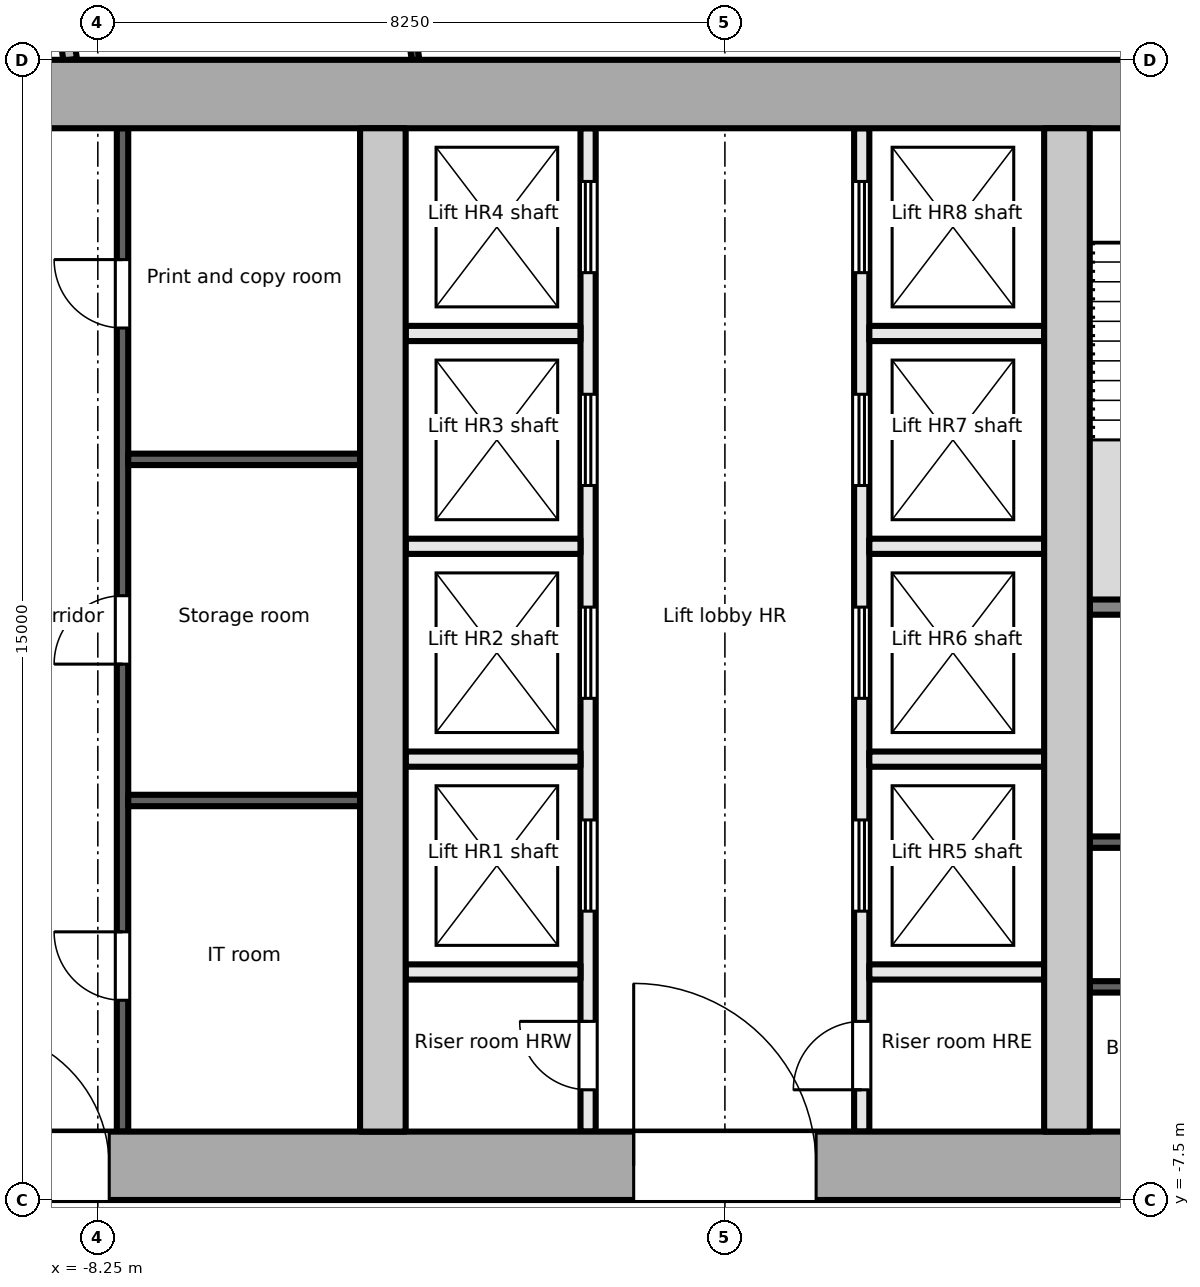
"""IFC4 building model, lengths in metres.
Left out: names, types, materials, properties, quantities, classifications, styles, units other than length and angle.
Written with IfcOpenShell. Run it as: python <this file> out.ifc"""

import sys

from ifc_helpers import new_model, si_unit, direction, frame, frame_2d, origin, place, context, subcontext, project, spatial, rectangle, extrude, element, fill, save


model = new_model("IFC4")
c1 = context("Model", 3, precision=1e-05, world=origin(), true_north=direction((0.0, 1.0)))
c2 = subcontext(c1, "Body", "Model", "MODEL_VIEW")
j1 = project(units=[si_unit("LENGTHUNIT", "METRE"), si_unit("PLANEANGLEUNIT", "RADIAN")], contexts=[c1])
p1 = place(None, origin())
s1 = spatial("IfcSite", under=j1, at=p1, CompositionType="ELEMENT")
p2 = place(p1, origin())
s2 = spatial("IfcBuilding", under=s1, at=p2, CompositionType="ELEMENT")
p3 = place(p2, frame((0.0, 0.0, 255.1)))
s3 = spatial("IfcBuildingStorey", under=s2, at=p3, CompositionType="ELEMENT", Elevation=255.1)
p4 = place(p3, frame((-18.0, -7.05, -0.2), z_axis=(0.0, 0.0, 1.0), x_axis=(1.0, 0.0, 0.0)))
e1 = element("IfcWall", 1, at=p4, inside=s3, PredefinedType="SHEAR", context=c2, shape_type="SweptSolid", body=[
    extrude(rectangle(XDim=36.0, YDim=0.9, at=frame_2d((18.0, 0.0))), origin(), (0.0, 0.0, 1.0), 3.9),
])
p5 = place(p4, frame((8.1, 0.0, 0.2)))
e2 = element("IfcOpeningElement", 2, at=p5, cuts=e1, PredefinedType="OPENING", context=c2, shape_type="SweptSolid", body=[
    extrude(rectangle(XDim=1.8, YDim=2.1, at=frame_2d((0.9, 1.05))), frame((0.0, 0.46, 0.0), z_axis=(0.0, -1.0, 0.0), x_axis=(1.0, 0.0, 0.0)), (0.0, 0.0, 1.0), 0.921),
])
p6 = place(p4, frame((16.8, 0.0, 0.2)))
e3 = element("IfcOpeningElement", 3, at=p6, cuts=e1, PredefinedType="OPENING", context=c2, shape_type="SweptSolid", body=[
    extrude(rectangle(XDim=2.4, YDim=2.1, at=frame_2d((1.2, 1.05))), frame((0.0, 0.46, 0.0), z_axis=(0.0, -1.0, 0.0), x_axis=(1.0, 0.0, 0.0)), (0.0, 0.0, 1.0), 0.921),
])
p7 = place(p4, frame((26.1, 0.0, 0.2)))
e4 = element("IfcOpeningElement", 4, at=p7, cuts=e1, PredefinedType="OPENING", context=c2, shape_type="SweptSolid", body=[
    extrude(rectangle(XDim=2.4, YDim=2.1, at=frame_2d((1.2, 1.05))), frame((0.0, 0.46, 0.0), z_axis=(0.0, -1.0, 0.0), x_axis=(1.0, 0.0, 0.0)), (0.0, 0.0, 1.0), 0.921),
])
p8 = place(p3, frame((-18.0, 7.05, -0.2), z_axis=(0.0, 0.0, 1.0), x_axis=(1.0, 0.0, 0.0)))
e5 = element("IfcWall", 5, at=p8, inside=s3, PredefinedType="SHEAR", context=c2, shape_type="SweptSolid", body=[
    extrude(rectangle(XDim=36.0, YDim=0.9, at=frame_2d((18.0, 0.0))), origin(), (0.0, 0.0, 1.0), 3.9),
])
for number, where, z_axis, x_axis in (
    (6, (-4.5, -6.6, -0.2), (0.0, 0.0, 1.0), (0.0, 1.0, 0.0)),
    (7, (4.5, -6.6, -0.2), (0.0, 0.0, 1.0), (0.0, 1.0, 0.0)),
):
    element("IfcWall", number, at=place(p3, frame(where, z_axis=z_axis, x_axis=x_axis)), inside=s3, PredefinedType="SHEAR", context=c2, shape_type="SweptSolid", body=[
        extrude(rectangle(XDim=13.2, YDim=0.6, at=frame_2d((6.6, 0.0))), origin(), (0.0, 0.0, 1.0), 3.9),
    ])
p9 = place(p3, frame((-7.925, -6.6, 0.0), z_axis=(0.0, 0.0, 1.0), x_axis=(0.0, 1.0, 0.0)))
e8 = element("IfcWall", 8, at=p9, inside=s3, PredefinedType="PARTITIONING", context=c2, shape_type="SweptSolid", body=[
    extrude(rectangle(XDim=13.2, YDim=0.15, at=frame_2d((6.6, 0.0))), origin(), (0.0, 0.0, 1.0), 3.7),
])
p10 = place(p9, frame((1.728, 0.0, 0.0)))
e9 = element("IfcOpeningElement", 9, at=p10, cuts=e8, PredefinedType="OPENING", context=c2, shape_type="SweptSolid", body=[
    extrude(rectangle(XDim=0.9, YDim=2.1, at=frame_2d((0.45, 1.05))), frame((0.0, 0.085, 0.0), z_axis=(0.0, -1.0, 0.0), x_axis=(1.0, 0.0, 0.0)), (0.0, 0.0, 1.0), 0.171),
])
p11 = place(p9, frame((6.15, 0.0, 0.0)))
e10 = element("IfcOpeningElement", 10, at=p11, cuts=e8, PredefinedType="OPENING", context=c2, shape_type="SweptSolid", body=[
    extrude(rectangle(XDim=0.9, YDim=2.1, at=frame_2d((0.45, 1.05))), frame((0.0, 0.085, 0.0), z_axis=(0.0, -1.0, 0.0), x_axis=(1.0, 0.0, 0.0)), (0.0, 0.0, 1.0), 0.171),
])
p12 = place(p9, frame((10.572, 0.0, 0.0)))
e11 = element("IfcOpeningElement", 11, at=p12, cuts=e8, PredefinedType="OPENING", context=c2, shape_type="SweptSolid", body=[
    extrude(rectangle(XDim=0.9, YDim=2.1, at=frame_2d((0.45, 1.05))), frame((0.0, 0.085, 0.0), z_axis=(0.0, -1.0, 0.0), x_axis=(1.0, 0.0, 0.0)), (0.0, 0.0, 1.0), 0.171),
])
for number, where, z_axis, x_axis in (
    (12, (-7.85, -2.244, 0.0), (0.0, 0.0, 1.0), (1.0, 0.0, 0.0)),
    (13, (-7.85, 2.244, 0.0), (0.0, 0.0, 1.0), (1.0, 0.0, 0.0)),
):
    element("IfcWall", number, at=place(p3, frame(where, z_axis=z_axis, x_axis=x_axis)), inside=s3, PredefinedType="PARTITIONING", context=c2, shape_type="SweptSolid", body=[
        extrude(rectangle(XDim=3.05, YDim=0.15, at=frame_2d((1.525, 0.0))), origin(), (0.0, 0.0, 1.0), 3.7),
    ])
p13 = place(p3, frame((-1.8, -6.6, 0.0), z_axis=(0.0, 0.0, 1.0), x_axis=(0.0, 1.0, 0.0)))
e14 = element("IfcWall", 14, at=p13, inside=s3, PredefinedType="PARTITIONING", context=c2, shape_type="SweptSolid", body=[
    extrude(rectangle(XDim=13.2, YDim=0.2, at=frame_2d((6.6, 0.0))), origin(), (0.0, 0.0, 1.0), 3.7),
])
p14 = place(p13, frame((0.55, 0.0, 0.0)))
e15 = element("IfcOpeningElement", 15, at=p14, cuts=e14, PredefinedType="OPENING", context=c2, shape_type="SweptSolid", body=[
    extrude(rectangle(XDim=0.9, YDim=2.1, at=frame_2d((0.45, 1.05))), frame((0.0, 0.111, 0.0), z_axis=(0.0, -1.0, 0.0), x_axis=(1.0, 0.0, 0.0)), (0.0, 0.0, 1.0), 0.221),
])
p15 = place(p13, frame((2.9, 0.0, 0.0)))
e16 = element("IfcOpeningElement", 16, at=p15, cuts=e14, PredefinedType="OPENING", context=c2, shape_type="SweptSolid", body=[
    extrude(rectangle(XDim=1.2, YDim=2.1, at=frame_2d((0.6, 1.05))), frame((0.0, 0.111, 0.0), z_axis=(0.0, -1.0, 0.0), x_axis=(1.0, 0.0, 0.0)), (0.0, 0.0, 1.0), 0.221),
])
p16 = place(p13, frame((5.7, 0.0, 0.0)))
e17 = element("IfcOpeningElement", 17, at=p16, cuts=e14, PredefinedType="OPENING", context=c2, shape_type="SweptSolid", body=[
    extrude(rectangle(XDim=1.2, YDim=2.1, at=frame_2d((0.6, 1.05))), frame((0.0, 0.111, 0.0), z_axis=(0.0, -1.0, 0.0), x_axis=(1.0, 0.0, 0.0)), (0.0, 0.0, 1.0), 0.221),
])
p17 = place(p13, frame((8.5, 0.0, 0.0)))
e18 = element("IfcOpeningElement", 18, at=p17, cuts=e14, PredefinedType="OPENING", context=c2, shape_type="SweptSolid", body=[
    extrude(rectangle(XDim=1.2, YDim=2.1, at=frame_2d((0.6, 1.05))), frame((0.0, 0.111, 0.0), z_axis=(0.0, -1.0, 0.0), x_axis=(1.0, 0.0, 0.0)), (0.0, 0.0, 1.0), 0.221),
])
p18 = place(p13, frame((11.3, 0.0, 0.0)))
e19 = element("IfcOpeningElement", 19, at=p18, cuts=e14, PredefinedType="OPENING", context=c2, shape_type="SweptSolid", body=[
    extrude(rectangle(XDim=1.2, YDim=2.1, at=frame_2d((0.6, 1.05))), frame((0.0, 0.111, 0.0), z_axis=(0.0, -1.0, 0.0), x_axis=(1.0, 0.0, 0.0)), (0.0, 0.0, 1.0), 0.221),
])
p19 = place(p3, frame((1.8, -6.6, 0.0), z_axis=(0.0, 0.0, 1.0), x_axis=(0.0, 1.0, 0.0)))
e20 = element("IfcWall", 20, at=p19, inside=s3, PredefinedType="PARTITIONING", context=c2, shape_type="SweptSolid", body=[
    extrude(rectangle(XDim=13.2, YDim=0.2, at=frame_2d((6.6, 0.0))), origin(), (0.0, 0.0, 1.0), 3.7),
])
p20 = place(p19, frame((0.55, 0.0, 0.0)))
e21 = element("IfcOpeningElement", 21, at=p20, cuts=e20, PredefinedType="OPENING", context=c2, shape_type="SweptSolid", body=[
    extrude(rectangle(XDim=0.9, YDim=2.1, at=frame_2d((0.45, 1.05))), frame((0.0, 0.111, 0.0), z_axis=(0.0, -1.0, 0.0), x_axis=(1.0, 0.0, 0.0)), (0.0, 0.0, 1.0), 0.221),
])
p21 = place(p19, frame((2.9, 0.0, 0.0)))
e22 = element("IfcOpeningElement", 22, at=p21, cuts=e20, PredefinedType="OPENING", context=c2, shape_type="SweptSolid", body=[
    extrude(rectangle(XDim=1.2, YDim=2.1, at=frame_2d((0.6, 1.05))), frame((0.0, 0.111, 0.0), z_axis=(0.0, -1.0, 0.0), x_axis=(1.0, 0.0, 0.0)), (0.0, 0.0, 1.0), 0.221),
])
p22 = place(p19, frame((5.7, 0.0, 0.0)))
e23 = element("IfcOpeningElement", 23, at=p22, cuts=e20, PredefinedType="OPENING", context=c2, shape_type="SweptSolid", body=[
    extrude(rectangle(XDim=1.2, YDim=2.1, at=frame_2d((0.6, 1.05))), frame((0.0, 0.111, 0.0), z_axis=(0.0, -1.0, 0.0), x_axis=(1.0, 0.0, 0.0)), (0.0, 0.0, 1.0), 0.221),
])
p23 = place(p19, frame((8.5, 0.0, 0.0)))
e24 = element("IfcOpeningElement", 24, at=p23, cuts=e20, PredefinedType="OPENING", context=c2, shape_type="SweptSolid", body=[
    extrude(rectangle(XDim=1.2, YDim=2.1, at=frame_2d((0.6, 1.05))), frame((0.0, 0.111, 0.0), z_axis=(0.0, -1.0, 0.0), x_axis=(1.0, 0.0, 0.0)), (0.0, 0.0, 1.0), 0.221),
])
p24 = place(p19, frame((11.3, 0.0, 0.0)))
e25 = element("IfcOpeningElement", 25, at=p24, cuts=e20, PredefinedType="OPENING", context=c2, shape_type="SweptSolid", body=[
    extrude(rectangle(XDim=1.2, YDim=2.1, at=frame_2d((0.6, 1.05))), frame((0.0, 0.111, 0.0), z_axis=(0.0, -1.0, 0.0), x_axis=(1.0, 0.0, 0.0)), (0.0, 0.0, 1.0), 0.221),
])
for number, where, z_axis, x_axis in (
    (26, (-4.2, -1.7, 0.0), (0.0, 0.0, 1.0), (1.0, 0.0, 0.0)),
    (27, (-4.2, 1.1, 0.0), (0.0, 0.0, 1.0), (1.0, 0.0, 0.0)),
    (28, (-4.2, 3.9, 0.0), (0.0, 0.0, 1.0), (1.0, 0.0, 0.0)),
    (29, (-4.2, -4.5, 0.0), (0.0, 0.0, 1.0), (1.0, 0.0, 0.0)),
    (30, (1.9, -1.7, 0.0), (0.0, 0.0, 1.0), (1.0, 0.0, 0.0)),
    (31, (1.9, 1.1, 0.0), (0.0, 0.0, 1.0), (1.0, 0.0, 0.0)),
    (32, (1.9, 3.9, 0.0), (0.0, 0.0, 1.0), (1.0, 0.0, 0.0)),
    (33, (1.9, -4.5, 0.0), (0.0, 0.0, 1.0), (1.0, 0.0, 0.0)),
):
    element("IfcWall", number, at=place(p3, frame(where, z_axis=z_axis, x_axis=x_axis)), inside=s3, PredefinedType="PARTITIONING", context=c2, shape_type="SweptSolid", body=[
        extrude(rectangle(XDim=2.3, YDim=0.2, at=frame_2d((1.15, 0.0))), origin(), (0.0, 0.0, 1.0), 3.7),
    ])
p25 = place(p3, frame((4.8, 0.3, 0.0), z_axis=(0.0, 0.0, 1.0), x_axis=(1.0, 0.0, 0.0)))
e34 = element("IfcWall", 34, at=p25, inside=s3, PredefinedType="PARTITIONING", context=c2, shape_type="SweptSolid", body=[
    extrude(rectangle(XDim=3.15, YDim=0.2, at=frame_2d((1.575, 0.0))), origin(), (0.0, 0.0, 1.0), 3.7),
])
for number, where, z_axis, x_axis in (
    (35, (4.8, -4.696, 0.0), (0.0, 0.0, 1.0), (1.0, 0.0, 0.0)),
    (36, (4.8, -2.792, 0.0), (0.0, 0.0, 1.0), (1.0, 0.0, 0.0)),
):
    element("IfcWall", number, at=place(p3, frame(where, z_axis=z_axis, x_axis=x_axis)), inside=s3, PredefinedType="PARTITIONING", context=c2, shape_type="SweptSolid", body=[
        extrude(rectangle(XDim=3.15, YDim=0.15, at=frame_2d((1.575, 0.0))), origin(), (0.0, 0.0, 1.0), 3.7),
    ])
p26 = place(p3, frame((-9.273, 12.191, 0.0), z_axis=(0.0, 0.0, 1.0), x_axis=(0.139104789371, -0.990277666907, 0.0)))
e37 = element("IfcWall", 37, at=p26, inside=s3, PredefinedType="PARTITIONING", context=c2, shape_type="SweptSolid", body=[
    extrude(rectangle(XDim=4.737, YDim=0.18, at=frame_2d((2.369, 0.0))), origin(), (0.0, 0.0, 1.0), 3.4),
])
p27 = place(p3, frame((-4.07, 7.5, 0.0), z_axis=(0.0, 0.0, 1.0), x_axis=(-0.139122430522, 0.990275188685, 0.0)))
e38 = element("IfcWall", 38, at=p27, inside=s3, PredefinedType="PARTITIONING", context=c2, shape_type="SweptSolid", body=[
    extrude(rectangle(XDim=5.368, YDim=0.1, at=frame_2d((2.684, 0.0))), origin(), (0.0, 0.0, 1.0), 3.4),
])
p28 = place(p27, frame((3.098, 0.0, 0.0)))
e39 = element("IfcOpeningElement", 39, at=p28, cuts=e38, PredefinedType="OPENING", context=c2, shape_type="SweptSolid", body=[
    extrude(rectangle(XDim=0.8, YDim=2.1, at=frame_2d((0.4, 1.05))), frame((0.0, 0.061, 0.0), z_axis=(0.0, -1.0, 0.0), x_axis=(1.0, 0.0, 0.0)), (0.0, 0.0, 1.0), 0.121),
])
p29 = place(p27, frame((0.649, 0.0, 0.9)))
e40 = element("IfcOpeningElement", 40, at=p29, cuts=e38, PredefinedType="OPENING", context=c2, shape_type="SweptSolid", body=[
    extrude(rectangle(XDim=1.8, YDim=1.2, at=frame_2d((0.9, 0.6))), frame((0.0, 0.061, 0.0), z_axis=(0.0, -1.0, 0.0), x_axis=(1.0, 0.0, 0.0)), (0.0, 0.0, 1.0), 0.121),
])
p30 = place(p10, origin())
e41 = element("IfcDoor", 41, at=p30, inside=s3, OperationType="SINGLE_SWING_RIGHT", PredefinedType="DOOR", context=c2, shape_type="SweptSolid", body=[
    extrude(rectangle(XDim=0.9, YDim=2.1, at=frame_2d((0.45, 1.05))), frame((0.0, 0.025, 0.0), z_axis=(0.0, -1.0, 0.0), x_axis=(1.0, 0.0, 0.0)), (0.0, 0.0, 1.0), 0.05),
])
fill(e9, e41)
p31 = place(p11, origin())
e42 = element("IfcDoor", 42, at=p31, inside=s3, OperationType="SINGLE_SWING_LEFT", PredefinedType="DOOR", context=c2, shape_type="SweptSolid", body=[
    extrude(rectangle(XDim=0.9, YDim=2.1, at=frame_2d((0.45, 1.05))), frame((0.0, 0.025, 0.0), z_axis=(0.0, -1.0, 0.0), x_axis=(1.0, 0.0, 0.0)), (0.0, 0.0, 1.0), 0.05),
])
fill(e10, e42)
p32 = place(p12, origin())
e43 = element("IfcDoor", 43, at=p32, inside=s3, OperationType="SINGLE_SWING_RIGHT", PredefinedType="DOOR", context=c2, shape_type="SweptSolid", body=[
    extrude(rectangle(XDim=0.9, YDim=2.1, at=frame_2d((0.45, 1.05))), frame((0.0, 0.025, 0.0), z_axis=(0.0, -1.0, 0.0), x_axis=(1.0, 0.0, 0.0)), (0.0, 0.0, 1.0), 0.05),
])
fill(e11, e43)
p33 = place(p5, origin())
e44 = element("IfcDoor", 44, at=p33, inside=s3, OperationType="SINGLE_SWING_LEFT", PredefinedType="DOOR", context=c2, shape_type="SweptSolid", body=[
    extrude(rectangle(XDim=1.8, YDim=2.1, at=frame_2d((0.9, 1.05))), frame((0.0, 0.025, 0.0), z_axis=(0.0, -1.0, 0.0), x_axis=(1.0, 0.0, 0.0)), (0.0, 0.0, 1.0), 0.05),
])
fill(e2, e44)
p34 = place(p14, origin())
e45 = element("IfcDoor", 45, at=p34, inside=s3, OperationType="SINGLE_SWING_RIGHT", PredefinedType="DOOR", context=c2, shape_type="SweptSolid", body=[
    extrude(rectangle(XDim=0.9, YDim=2.1, at=frame_2d((0.45, 1.05))), frame((0.0, 0.025, 0.0), z_axis=(0.0, -1.0, 0.0), x_axis=(1.0, 0.0, 0.0)), (0.0, 0.0, 1.0), 0.05),
])
fill(e15, e45)
p35 = place(p15, origin())
e46 = element("IfcDoor", 46, at=p35, inside=s3, OperationType="DOUBLE_DOOR_SLIDING", PredefinedType="DOOR", context=c2, shape_type="SweptSolid", body=[
    extrude(rectangle(XDim=1.2, YDim=2.1, at=frame_2d((0.6, 1.05))), frame((0.0, 0.025, 0.0), z_axis=(0.0, -1.0, 0.0), x_axis=(1.0, 0.0, 0.0)), (0.0, 0.0, 1.0), 0.05),
])
fill(e16, e46)
p36 = place(p16, origin())
e47 = element("IfcDoor", 47, at=p36, inside=s3, OperationType="DOUBLE_DOOR_SLIDING", PredefinedType="DOOR", context=c2, shape_type="SweptSolid", body=[
    extrude(rectangle(XDim=1.2, YDim=2.1, at=frame_2d((0.6, 1.05))), frame((0.0, 0.025, 0.0), z_axis=(0.0, -1.0, 0.0), x_axis=(1.0, 0.0, 0.0)), (0.0, 0.0, 1.0), 0.05),
])
fill(e17, e47)
p37 = place(p17, origin())
e48 = element("IfcDoor", 48, at=p37, inside=s3, OperationType="DOUBLE_DOOR_SLIDING", PredefinedType="DOOR", context=c2, shape_type="SweptSolid", body=[
    extrude(rectangle(XDim=1.2, YDim=2.1, at=frame_2d((0.6, 1.05))), frame((0.0, 0.025, 0.0), z_axis=(0.0, -1.0, 0.0), x_axis=(1.0, 0.0, 0.0)), (0.0, 0.0, 1.0), 0.05),
])
fill(e18, e48)
p38 = place(p18, origin())
e49 = element("IfcDoor", 49, at=p38, inside=s3, OperationType="DOUBLE_DOOR_SLIDING", PredefinedType="DOOR", context=c2, shape_type="SweptSolid", body=[
    extrude(rectangle(XDim=1.2, YDim=2.1, at=frame_2d((0.6, 1.05))), frame((0.0, 0.025, 0.0), z_axis=(0.0, -1.0, 0.0), x_axis=(1.0, 0.0, 0.0)), (0.0, 0.0, 1.0), 0.05),
])
fill(e19, e49)
p39 = place(p20, origin())
e50 = element("IfcDoor", 50, at=p39, inside=s3, OperationType="SINGLE_SWING_LEFT", PredefinedType="DOOR", context=c2, shape_type="SweptSolid", body=[
    extrude(rectangle(XDim=0.9, YDim=2.1, at=frame_2d((0.45, 1.05))), frame((0.0, 0.025, 0.0), z_axis=(0.0, -1.0, 0.0), x_axis=(1.0, 0.0, 0.0)), (0.0, 0.0, 1.0), 0.05),
])
fill(e21, e50)
p40 = place(p21, origin())
e51 = element("IfcDoor", 51, at=p40, inside=s3, OperationType="DOUBLE_DOOR_SLIDING", PredefinedType="DOOR", context=c2, shape_type="SweptSolid", body=[
    extrude(rectangle(XDim=1.2, YDim=2.1, at=frame_2d((0.6, 1.05))), frame((0.0, 0.025, 0.0), z_axis=(0.0, -1.0, 0.0), x_axis=(1.0, 0.0, 0.0)), (0.0, 0.0, 1.0), 0.05),
])
fill(e22, e51)
p41 = place(p22, origin())
e52 = element("IfcDoor", 52, at=p41, inside=s3, OperationType="DOUBLE_DOOR_SLIDING", PredefinedType="DOOR", context=c2, shape_type="SweptSolid", body=[
    extrude(rectangle(XDim=1.2, YDim=2.1, at=frame_2d((0.6, 1.05))), frame((0.0, 0.025, 0.0), z_axis=(0.0, -1.0, 0.0), x_axis=(1.0, 0.0, 0.0)), (0.0, 0.0, 1.0), 0.05),
])
fill(e23, e52)
p42 = place(p23, origin())
e53 = element("IfcDoor", 53, at=p42, inside=s3, OperationType="DOUBLE_DOOR_SLIDING", PredefinedType="DOOR", context=c2, shape_type="SweptSolid", body=[
    extrude(rectangle(XDim=1.2, YDim=2.1, at=frame_2d((0.6, 1.05))), frame((0.0, 0.025, 0.0), z_axis=(0.0, -1.0, 0.0), x_axis=(1.0, 0.0, 0.0)), (0.0, 0.0, 1.0), 0.05),
])
fill(e24, e53)
p43 = place(p24, origin())
e54 = element("IfcDoor", 54, at=p43, inside=s3, OperationType="DOUBLE_DOOR_SLIDING", PredefinedType="DOOR", context=c2, shape_type="SweptSolid", body=[
    extrude(rectangle(XDim=1.2, YDim=2.1, at=frame_2d((0.6, 1.05))), frame((0.0, 0.025, 0.0), z_axis=(0.0, -1.0, 0.0), x_axis=(1.0, 0.0, 0.0)), (0.0, 0.0, 1.0), 0.05),
])
fill(e25, e54)
p44 = place(p6, origin())
e55 = element("IfcDoor", 55, at=p44, inside=s3, OperationType="DOUBLE_DOOR_DOUBLE_SWING", PredefinedType="DOOR", context=c2, shape_type="SweptSolid", body=[
    extrude(rectangle(XDim=2.4, YDim=2.1, at=frame_2d((1.2, 1.05))), frame((0.0, 0.025, 0.0), z_axis=(0.0, -1.0, 0.0), x_axis=(1.0, 0.0, 0.0)), (0.0, 0.0, 1.0), 0.05),
])
fill(e3, e55)
save(model, sys.argv[1])
